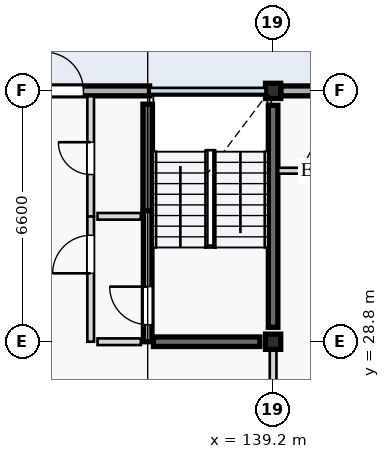
"""IFC4 building model, lengths in metres.
Left out: names, types, materials, properties, quantities, classifications, styles, units other than length and angle.
Written with IfcOpenShell. Run it as: python <this file> out.ifc"""

import sys

from ifc_helpers import new_model, si_unit, direction, frame, frame_2d, origin, origin_2d, place, context, subcontext, project, spatial, rectangle, extrude, element, fill, save


model = new_model("IFC4")
c1 = context("Model", 3, precision=1e-05, world=origin(), true_north=direction((0.0, 1.0)))
c2 = subcontext(c1, "Body", "Model", "MODEL_VIEW")
j1 = project(units=[si_unit("LENGTHUNIT", "METRE"), si_unit("PLANEANGLEUNIT", "RADIAN")], contexts=[c1])
p1 = place(None, origin())
s1 = spatial("IfcSite", under=j1, at=p1, CompositionType="ELEMENT")
p2 = place(p1, origin())
s2 = spatial("IfcBuilding", under=s1, at=p2, CompositionType="ELEMENT")
p3 = place(p2, frame((0.0, 0.0, 37.2)))
s3 = spatial("IfcBuildingStorey", under=s2, at=p3, CompositionType="ELEMENT", Elevation=37.2)
for number, where, z_axis, x_axis in (
    (1, (139.2, 28.8, 0.0), (0.0, 0.0, 1.0), (1.0, 0.0, 0.0)),
    (2, (139.2, 35.4, 0.0), (0.0, 0.0, 1.0), (1.0, 0.0, 0.0)),
):
    element("IfcColumn", number, at=place(p3, frame(where, z_axis=z_axis, x_axis=x_axis)), inside=s3, PredefinedType="COLUMN", context=c2, shape_type="SweptSolid", body=[
        extrude(rectangle(XDim=0.4, YDim=0.4, at=origin_2d()), origin(), (0.0, 0.0, 1.0), 3.2),
    ])
p4 = place(p3, frame((139.2, 29.18, 0.0), z_axis=(0.0, 0.0, 1.0), x_axis=(0.0, 1.0, 0.0)))
e3 = element("IfcWall", 3, at=p4, inside=s3, PredefinedType="SHEAR", context=c2, shape_type="SweptSolid", body=[
    extrude(rectangle(XDim=5.84, YDim=0.25, at=frame_2d((2.92, 0.0))), origin(), (0.0, 0.0, 1.0), 2.97),
])
for number, where, z_axis, x_axis in (
    (4, (135.9, 32.25, 0.0), (0.0, 0.0, 1.0), (0.0, 1.0, 0.0)),
    (5, (136.05, 28.8, 0.0), (0.0, 0.0, 1.0), (1.0, 0.0, 0.0)),
):
    element("IfcWall", number, at=place(p3, frame(where, z_axis=z_axis, x_axis=x_axis)), inside=s3, PredefinedType="SHEAR", context=c2, shape_type="SweptSolid", body=[
        extrude(rectangle(XDim=2.8, YDim=0.25, at=frame_2d((1.4, 0.0))), origin(), (0.0, 0.0, 1.0), 2.97),
    ])
p5 = place(p3, frame((132.8, 35.4, 0.0), z_axis=(0.0, 0.0, 1.0), x_axis=(1.0, 0.0, 0.0)))
e6 = element("IfcWall", 6, at=p5, inside=s3, PredefinedType="STANDARD", context=c2, shape_type="SweptSolid", body=[
    extrude(rectangle(XDim=3.15, YDim=0.26, at=frame_2d((1.575, 0.0))), origin(), (0.0, 0.0, 1.0), 2.97),
])
p6 = place(p5, frame((0.39, 0.0, 0.0)))
e7 = element("IfcOpeningElement", 7, at=p6, cuts=e6, PredefinedType="OPENING", context=c2, shape_type="SweptSolid", body=[
    extrude(rectangle(XDim=1.02, YDim=2.16, at=frame_2d((0.51, 1.08))), frame((0.0, 0.14, 0.0), z_axis=(0.0, -1.0, 0.0), x_axis=(1.0, 0.0, 0.0)), (0.0, 0.0, 1.0), 0.28),
])
p7 = place(p3, frame((139.4, 35.4, 0.0), z_axis=(0.0, 0.0, 1.0), x_axis=(1.0, 0.0, 0.0)))
e8 = element("IfcWall", 8, at=p7, inside=s3, PredefinedType="STANDARD", context=c2, shape_type="SweptSolid", body=[
    extrude(rectangle(XDim=4.07, YDim=0.26, at=frame_2d((2.035, 0.0))), origin(), (0.0, 0.0, 1.0), 2.65),
])
p8 = place(p3, frame((135.9, 28.8, 0.0), z_axis=(0.0, 0.0, 1.0), x_axis=(0.0, 1.0, 0.0)))
e9 = element("IfcWall", 9, at=p8, inside=s3, PredefinedType="STANDARD", context=c2, shape_type="SweptSolid", body=[
    extrude(rectangle(XDim=3.45, YDim=0.225, at=frame_2d((1.725, 0.0))), origin(), (0.0, 0.0, 1.0), 2.97),
])
p9 = place(p8, frame((0.45, 0.0, 0.0)))
e10 = element("IfcOpeningElement", 10, at=p9, cuts=e9, PredefinedType="OPENING", context=c2, shape_type="SweptSolid", body=[
    extrude(rectangle(XDim=1.0, YDim=2.1, at=frame_2d((0.5, 1.05))), frame((0.0, 0.123, 0.0), z_axis=(0.0, -1.0, 0.0), x_axis=(1.0, 0.0, 0.0)), (0.0, 0.0, 1.0), 0.245),
])
p10 = place(p3, frame((134.4, 28.8, 0.0), z_axis=(0.0, 0.0, 1.0), x_axis=(0.0, 1.0, 0.0)))
e11 = element("IfcWall", 11, at=p10, inside=s3, PredefinedType="PARTITIONING", context=c2, shape_type="SweptSolid", body=[
    extrude(rectangle(XDim=3.3, YDim=0.175, at=frame_2d((1.65, 0.0))), origin(), (0.0, 0.0, 1.0), 2.97),
])
p11 = place(p10, frame((1.8, 0.0, 0.0)))
e12 = element("IfcOpeningElement", 12, at=p11, cuts=e11, PredefinedType="OPENING", context=c2, shape_type="SweptSolid", body=[
    extrude(rectangle(XDim=1.0, YDim=2.16, at=frame_2d((0.5, 1.08))), frame((0.0, 0.097, 0.0), z_axis=(0.0, -1.0, 0.0), x_axis=(1.0, 0.0, 0.0)), (0.0, 0.0, 1.0), 0.195),
])
p12 = place(p3, frame((134.4, 32.1, 0.0), z_axis=(0.0, 0.0, 1.0), x_axis=(0.0, 1.0, 0.0)))
e13 = element("IfcWall", 13, at=p12, inside=s3, PredefinedType="PARTITIONING", context=c2, shape_type="SweptSolid", body=[
    extrude(rectangle(XDim=3.16, YDim=0.175, at=frame_2d((1.58, 0.0))), origin(), (0.0, 0.0, 1.0), 2.97),
])
p13 = place(p12, frame((1.1, 0.0, 0.0)))
e14 = element("IfcOpeningElement", 14, at=p13, cuts=e13, PredefinedType="OPENING", context=c2, shape_type="SweptSolid", body=[
    extrude(rectangle(XDim=0.85, YDim=2.0, at=frame_2d((0.425, 1.0))), frame((0.0, 0.097, 0.0), z_axis=(0.0, -1.0, 0.0), x_axis=(1.0, 0.0, 0.0)), (0.0, 0.0, 1.0), 0.195),
])
for number, where, z_axis, x_axis in (
    (15, (134.58, 28.8, 0.0), (0.0, 0.0, 1.0), (1.0, 0.0, 0.0)),
    (16, (134.58, 32.1, 0.0), (0.0, 0.0, 1.0), (1.0, 0.0, 0.0)),
):
    element("IfcWall", number, at=place(p3, frame(where, z_axis=z_axis, x_axis=x_axis)), inside=s3, PredefinedType="PARTITIONING", context=c2, shape_type="SweptSolid", body=[
        extrude(rectangle(XDim=1.14, YDim=0.175, at=frame_2d((0.57, 0.0))), origin(), (0.0, 0.0, 1.0), 2.97),
    ])
p14 = place(p3, frame((139.2, 22.2, 0.0), z_axis=(0.0, 0.0, 1.0), x_axis=(0.0, 1.0, 0.0)))
e17 = element("IfcWall", 17, at=p14, inside=s3, PredefinedType="PARTITIONING", context=c2, shape_type="SweptSolid", body=[
    extrude(rectangle(XDim=6.6, YDim=0.175, at=frame_2d((3.3, 0.0))), origin(), (0.0, 0.0, 1.0), 2.55),
])
p15 = place(p14, frame((3.85, 0.0, 0.0)))
e18 = element("IfcOpeningElement", 18, at=p15, cuts=e17, PredefinedType="OPENING", context=c2, shape_type="SweptSolid", body=[
    extrude(rectangle(XDim=0.95, YDim=2.1, at=frame_2d((0.475, 1.05))), frame((0.0, 0.097, 0.0), z_axis=(0.0, -1.0, 0.0), x_axis=(1.0, 0.0, 0.0)), (0.0, 0.0, 1.0), 0.195),
])
p16 = place(p3, frame((139.335, 33.3, 0.0), z_axis=(0.0, 0.0, 1.0), x_axis=(1.0, 0.0, 0.0)))
e19 = element("IfcWall", 19, at=p16, inside=s3, PredefinedType="PARTITIONING", context=c2, shape_type="SweptSolid", body=[
    extrude(rectangle(XDim=2.265, YDim=0.155, at=frame_2d((1.133, 0.0))), origin(), (0.0, 0.0, 1.0), 2.97),
])
p17 = place(p16, frame((0.7, 0.0, 0.0)))
e20 = element("IfcOpeningElement", 20, at=p17, cuts=e19, PredefinedType="OPENING", context=c2, shape_type="SweptSolid", body=[
    extrude(rectangle(XDim=0.88, YDim=2.1, at=frame_2d((0.44, 1.05))), frame((0.0, 0.087, 0.0), z_axis=(0.0, -1.0, 0.0), x_axis=(1.0, 0.0, 0.0)), (0.0, 0.0, 1.0), 0.175),
])
p18 = place(p6, origin())
e21 = element("IfcDoor", 21, at=p18, inside=s3, OperationType="SINGLE_SWING_LEFT", PredefinedType="DOOR", context=c2, shape_type="SweptSolid", body=[
    extrude(rectangle(XDim=1.02, YDim=2.16, at=frame_2d((0.51, 1.08))), frame((0.0, 0.025, 0.0), z_axis=(0.0, -1.0, 0.0), x_axis=(1.0, 0.0, 0.0)), (0.0, 0.0, 1.0), 0.05),
])
fill(e7, e21)
p19 = place(p9, origin())
e22 = element("IfcDoor", 22, at=p19, inside=s3, OperationType="SINGLE_SWING_RIGHT", PredefinedType="DOOR", context=c2, shape_type="SweptSolid", body=[
    extrude(rectangle(XDim=1.0, YDim=2.1, at=frame_2d((0.5, 1.05))), frame((0.0, 0.025, 0.0), z_axis=(0.0, -1.0, 0.0), x_axis=(1.0, 0.0, 0.0)), (0.0, 0.0, 1.0), 0.05),
])
fill(e10, e22)
p20 = place(p11, origin())
e23 = element("IfcDoor", 23, at=p20, inside=s3, OperationType="SINGLE_SWING_LEFT", PredefinedType="DOOR", context=c2, shape_type="SweptSolid", body=[
    extrude(rectangle(XDim=1.0, YDim=2.16, at=frame_2d((0.5, 1.08))), frame((0.0, 0.025, 0.0), z_axis=(0.0, -1.0, 0.0), x_axis=(1.0, 0.0, 0.0)), (0.0, 0.0, 1.0), 0.05),
])
fill(e12, e23)
p21 = place(p13, origin())
e24 = element("IfcDoor", 24, at=p21, inside=s3, OperationType="SINGLE_SWING_RIGHT", PredefinedType="DOOR", context=c2, shape_type="SweptSolid", body=[
    extrude(rectangle(XDim=0.85, YDim=2.0, at=frame_2d((0.425, 1.0))), frame((0.0, 0.025, 0.0), z_axis=(0.0, -1.0, 0.0), x_axis=(1.0, 0.0, 0.0)), (0.0, 0.0, 1.0), 0.05),
])
fill(e14, e24)
p22 = place(p17, origin())
e25 = element("IfcDoor", 25, at=p22, inside=s3, OperationType="SINGLE_SWING_RIGHT", PredefinedType="DOOR", context=c2, shape_type="SweptSolid", body=[
    extrude(rectangle(XDim=0.88, YDim=2.1, at=frame_2d((0.44, 1.05))), frame((0.0, 0.025, 0.0), z_axis=(0.0, -1.0, 0.0), x_axis=(1.0, 0.0, 0.0)), (0.0, 0.0, 1.0), 0.05),
])
fill(e20, e25)
save(model, sys.argv[1])
